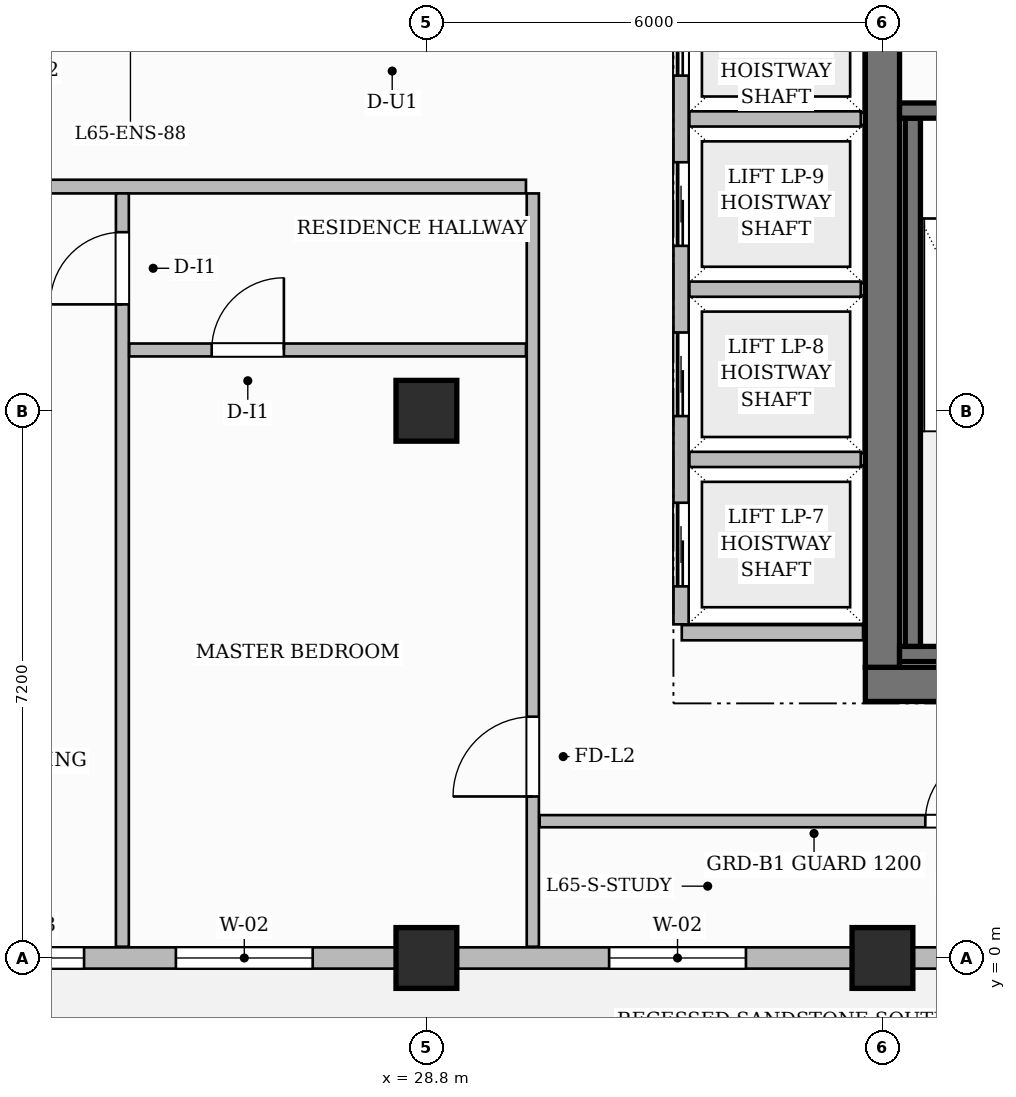
"""IFC4 building model, lengths in metres.
Left out: names, types, materials, properties, quantities, classifications, styles, units other than length and angle.
Written with IfcOpenShell. Run it as: python <this file> out.ifc"""

import sys

from ifc_helpers import new_model, si_unit, direction, frame, frame_2d, origin, origin_2d, place, context, subcontext, project, spatial, rectangle, extrude, source, transform, mapped, element, fill, save


model = new_model("IFC4")
c1 = context("Model", 3, precision=1e-05, world=origin(), true_north=direction((0.0, 1.0)))
c2 = subcontext(c1, "Body", "Model", "MODEL_VIEW")
j1 = project(units=[si_unit("LENGTHUNIT", "METRE"), si_unit("PLANEANGLEUNIT", "RADIAN")], contexts=[c1])
p1 = place(None, origin())
s1 = spatial("IfcSite", under=j1, at=p1, CompositionType="ELEMENT")
p2 = place(p1, origin())
s2 = spatial("IfcBuilding", under=s1, at=p2, CompositionType="ELEMENT")
p3 = place(p2, frame((0.0, 0.0, 259.65)))
s3 = spatial("IfcBuildingStorey", under=s2, at=p3, CompositionType="ELEMENT", Elevation=259.65)
p4 = place(p3, frame((34.575, 3.6, 0.0), z_axis=(0.0, 0.0, 1.0), x_axis=(1.0, 0.0, 0.0)))
e1 = element("IfcWall", 1, at=p4, inside=s3, PredefinedType="SHEAR", context=c2, shape_type="SweptSolid", body=[
    extrude(rectangle(XDim=15.45, YDim=0.45, at=frame_2d((7.725, 0.0))), origin(), (0.0, 0.0, 1.0), 3.85),
])
p5 = place(p4, frame((4.775, 0.0, 0.0)))
e2 = element("IfcOpeningElement", 2, at=p5, cuts=e1, PredefinedType="OPENING", context=c2, shape_type="SweptSolid", body=[
    extrude(rectangle(XDim=0.9, YDim=2.1, at=frame_2d((0.45, 1.05))), frame((0.0, 0.235, 0.0), z_axis=(0.0, -1.0, 0.0), x_axis=(1.0, 0.0, 0.0)), (0.0, 0.0, 1.0), 0.47),
])
p6 = place(p4, frame((7.195, 0.0, 0.0)))
e3 = element("IfcOpeningElement", 3, at=p6, cuts=e1, PredefinedType="OPENING", context=c2, shape_type="SweptSolid", body=[
    extrude(rectangle(XDim=0.9, YDim=2.1, at=frame_2d((0.45, 1.05))), frame((0.0, 0.235, 0.0), z_axis=(0.0, -1.0, 0.0), x_axis=(1.0, 0.0, 0.0)), (0.0, 0.0, 1.0), 0.47),
])
p7 = place(p3, frame((34.8, 3.825, 0.0), z_axis=(0.0, 0.0, 1.0), x_axis=(0.0, 1.0, 0.0)))
e4 = element("IfcWall", 4, at=p7, inside=s3, PredefinedType="SHEAR", context=c2, shape_type="SweptSolid", body=[
    extrude(rectangle(XDim=10.35, YDim=0.45, at=frame_2d((5.175, 0.0))), origin(), (0.0, 0.0, 1.0), 3.85),
])
m1 = source(origin(), c2, "Body", "SweptSolid", [
    extrude(rectangle(XDim=0.8, YDim=0.8, at=origin_2d()), origin(), (0.0, 0.0, 1.0), 3.85),
])
for number, where, z_axis, x_axis in (
    (5, (28.8, 0.0, 0.0), (0.0, 0.0, 1.0), (1.0, 0.0, 0.0)),
    (6, (28.8, 7.2, 0.0), (0.0, 0.0, 1.0), (1.0, 0.0, 0.0)),
    (7, (34.8, 0.0, 0.0), (0.0, 0.0, 1.0), (1.0, 0.0, 0.0)),
):
    element("IfcColumn", number, at=place(p3, frame(where, z_axis=z_axis, x_axis=x_axis)), inside=s3, PredefinedType="COLUMN", context=c2, shape_type="MappedRepresentation", body=[
        mapped(m1, transform((0.0, 0.0, 0.0), scale=1.0)),
    ])
p8 = place(p3, frame((35.025, 4.0, 0.0), z_axis=(0.0, 0.0, 1.0), x_axis=(1.0, 0.0, 0.0)))
e8 = element("IfcWall", 8, at=p8, inside=s3, PredefinedType="SHEAR", context=c2, shape_type="SweptSolid", body=[
    extrude(rectangle(XDim=3.215, YDim=0.2, at=frame_2d((1.607, 0.0))), origin(), (0.0, 0.0, 1.0), 3.85),
])
p9 = place(p3, frame((35.2, 4.1, 0.0), z_axis=(0.0, 0.0, 1.0), x_axis=(0.0, 1.0, 0.0)))
e9 = element("IfcWall", 9, at=p9, inside=s3, PredefinedType="SHEAR", context=c2, shape_type="SweptSolid", body=[
    extrude(rectangle(XDim=6.95, YDim=0.2, at=frame_2d((3.475, 0.0))), origin(), (0.0, 0.0, 1.0), 3.85),
])
p10 = place(p3, frame((35.025, 11.15, 0.0), z_axis=(0.0, 0.0, 1.0), x_axis=(1.0, 0.0, 0.0)))
e10 = element("IfcWall", 10, at=p10, inside=s3, PredefinedType="SHEAR", context=c2, shape_type="SweptSolid", body=[
    extrude(rectangle(XDim=3.215, YDim=0.2, at=frame_2d((1.607, 0.0))), origin(), (0.0, 0.0, 1.0), 3.85),
])
p11 = place(p10, frame((1.12, 0.0, 0.0)))
e11 = element("IfcOpeningElement", 11, at=p11, cuts=e10, PredefinedType="OPENING", context=c2, shape_type="SweptSolid", body=[
    extrude(rectangle(XDim=1.05, YDim=2.2, at=frame_2d((0.525, 1.1))), frame((0.0, 0.11, 0.0), z_axis=(0.0, -1.0, 0.0), x_axis=(1.0, 0.0, 0.0)), (0.0, 0.0, 1.0), 0.22),
])
p12 = place(p3, frame((32.16, 4.28, 0.0), z_axis=(0.0, 0.0, 1.0), x_axis=(1.0, 0.0, 0.0)))
e12 = element("IfcWall", 12, at=p12, inside=s3, PredefinedType="PARTITIONING", context=c2, shape_type="SweptSolid", body=[
    extrude(rectangle(XDim=2.385, YDim=0.2, at=frame_2d((1.192, 0.0))), origin(), (0.0, 0.0, 1.0), 3.6),
])
p13 = place(p3, frame((32.15, 4.39, 0.0), z_axis=(0.0, 0.0, 1.0), x_axis=(0.0, 1.0, 0.0)))
e13 = element("IfcWall", 13, at=p13, inside=s3, PredefinedType="PARTITIONING", context=c2, shape_type="SweptSolid", body=[
    extrude(rectangle(XDim=8.82, YDim=0.2, at=frame_2d((4.41, 0.0))), origin(), (0.0, 0.0, 1.0), 3.6),
])
p14 = place(p13, frame((0.5, 0.0, 0.0)))
e14 = element("IfcOpeningElement", 14, at=p14, cuts=e13, PredefinedType="OPENING", context=c2, shape_type="SweptSolid", body=[
    extrude(rectangle(XDim=1.1, YDim=2.2, at=frame_2d((0.55, 1.1))), frame((0.0, 0.11, 0.0), z_axis=(0.0, -1.0, 0.0), x_axis=(1.0, 0.0, 0.0)), (0.0, 0.0, 1.0), 0.22),
])
p15 = place(p13, frame((2.74, 0.0, 0.0)))
e15 = element("IfcOpeningElement", 15, at=p15, cuts=e13, PredefinedType="OPENING", context=c2, shape_type="SweptSolid", body=[
    extrude(rectangle(XDim=1.1, YDim=2.2, at=frame_2d((0.55, 1.1))), frame((0.0, 0.11, 0.0), z_axis=(0.0, -1.0, 0.0), x_axis=(1.0, 0.0, 0.0)), (0.0, 0.0, 1.0), 0.22),
])
p16 = place(p13, frame((4.98, 0.0, 0.0)))
e16 = element("IfcOpeningElement", 16, at=p16, cuts=e13, PredefinedType="OPENING", context=c2, shape_type="SweptSolid", body=[
    extrude(rectangle(XDim=1.1, YDim=2.2, at=frame_2d((0.55, 1.1))), frame((0.0, 0.11, 0.0), z_axis=(0.0, -1.0, 0.0), x_axis=(1.0, 0.0, 0.0)), (0.0, 0.0, 1.0), 0.22),
])
p17 = place(p13, frame((7.22, 0.0, 0.0)))
e17 = element("IfcOpeningElement", 17, at=p17, cuts=e13, PredefinedType="OPENING", context=c2, shape_type="SweptSolid", body=[
    extrude(rectangle(XDim=1.1, YDim=2.2, at=frame_2d((0.55, 1.1))), frame((0.0, 0.11, 0.0), z_axis=(0.0, -1.0, 0.0), x_axis=(1.0, 0.0, 0.0)), (0.0, 0.0, 1.0), 0.22),
])
for number, where, z_axis, x_axis in (
    (18, (32.26, 6.56, 0.0), (0.0, 0.0, 1.0), (1.0, 0.0, 0.0)),
    (19, (32.26, 8.8, 0.0), (0.0, 0.0, 1.0), (1.0, 0.0, 0.0)),
    (20, (32.26, 11.04, 0.0), (0.0, 0.0, 1.0), (1.0, 0.0, 0.0)),
):
    element("IfcWall", number, at=place(p3, frame(where, z_axis=z_axis, x_axis=x_axis)), inside=s3, PredefinedType="PARTITIONING", context=c2, shape_type="SweptSolid", body=[
        extrude(rectangle(XDim=2.255, YDim=0.2, at=frame_2d((1.127, 0.0))), origin(), (0.0, 0.0, 1.0), 3.6),
    ])
p18 = place(p3, frame((18.148, 10.15, 0.0), z_axis=(0.0, 0.0, 1.0), x_axis=(1.0, 0.0, 0.0)))
e21 = element("IfcWall", 21, at=p18, inside=s3, PredefinedType="PARTITIONING", context=c2, shape_type="SweptSolid", body=[
    extrude(rectangle(XDim=11.962, YDim=0.18, at=frame_2d((5.981, 0.0))), origin(), (0.0, 0.0, 1.0), 3.6),
])
p19 = place(p18, frame((3.942, 0.0, 0.0)))
e22 = element("IfcOpeningElement", 22, at=p19, cuts=e21, PredefinedType="OPENING", context=c2, shape_type="SweptSolid", body=[
    extrude(rectangle(XDim=1.05, YDim=2.25, at=frame_2d((0.525, 1.125))), frame((0.0, 0.1, 0.0), z_axis=(0.0, -1.0, 0.0), x_axis=(1.0, 0.0, 0.0)), (0.0, 0.0, 1.0), 0.2),
])
p20 = place(p3, frame((30.2, 0.148, 0.0), z_axis=(0.0, 0.0, 1.0), x_axis=(0.0, 1.0, 0.0)))
e23 = element("IfcWall", 23, at=p20, inside=s3, PredefinedType="PARTITIONING", context=c2, shape_type="SweptSolid", body=[
    extrude(rectangle(XDim=9.912, YDim=0.16, at=frame_2d((4.956, 0.0))), origin(), (0.0, 0.0, 1.0), 3.6),
])
p21 = place(p20, frame((1.977, 0.0, 0.0)))
e24 = element("IfcOpeningElement", 24, at=p21, cuts=e23, PredefinedType="OPENING", context=c2, shape_type="SweptSolid", body=[
    extrude(rectangle(XDim=1.05, YDim=2.15, at=frame_2d((0.525, 1.075))), frame((0.0, 0.09, 0.0), z_axis=(0.0, -1.0, 0.0), x_axis=(1.0, 0.0, 0.0)), (0.0, 0.0, 1.0), 0.18),
])
p22 = place(p3, frame((30.29, 1.8, 0.0), z_axis=(0.0, 0.0, 1.0), x_axis=(1.0, 0.0, 0.0)))
e25 = element("IfcWall", 25, at=p22, inside=s3, PredefinedType="PARTITIONING", context=c2, shape_type="SweptSolid", body=[
    extrude(rectangle(XDim=19.37, YDim=0.16, at=frame_2d((9.685, 0.0))), origin(), (0.0, 0.0, 1.0), 3.6),
])
p23 = place(p22, frame((5.074, 0.0, 0.0)))
e26 = element("IfcOpeningElement", 26, at=p23, cuts=e25, PredefinedType="OPENING", context=c2, shape_type="SweptSolid", body=[
    extrude(rectangle(XDim=0.9, YDim=2.15, at=frame_2d((0.45, 1.075))), frame((0.0, 0.09, 0.0), z_axis=(0.0, -1.0, 0.0), x_axis=(1.0, 0.0, 0.0)), (0.0, 0.0, 1.0), 0.18),
])
p24 = place(p22, frame((14.06, 0.0, 0.0)))
e27 = element("IfcOpeningElement", 27, at=p24, cuts=e25, PredefinedType="OPENING", context=c2, shape_type="SweptSolid", body=[
    extrude(rectangle(XDim=0.9, YDim=2.15, at=frame_2d((0.45, 1.075))), frame((0.0, 0.09, 0.0), z_axis=(0.0, -1.0, 0.0), x_axis=(1.0, 0.0, 0.0)), (0.0, 0.0, 1.0), 0.18),
])
p25 = place(p3, frame((24.8, 0.148, 0.0), z_axis=(0.0, 0.0, 1.0), x_axis=(0.0, 1.0, 0.0)))
e28 = element("IfcWall", 28, at=p25, inside=s3, PredefinedType="PARTITIONING", context=c2, shape_type="SweptSolid", body=[
    extrude(rectangle(XDim=9.912, YDim=0.17, at=frame_2d((4.956, 0.0))), origin(), (0.0, 0.0, 1.0), 3.6),
])
p26 = place(p25, frame((8.452, 0.0, 0.0)))
e29 = element("IfcOpeningElement", 29, at=p26, cuts=e28, PredefinedType="OPENING", context=c2, shape_type="SweptSolid", body=[
    extrude(rectangle(XDim=0.95, YDim=2.15, at=frame_2d((0.475, 1.075))), frame((0.0, 0.095, 0.0), z_axis=(0.0, -1.0, 0.0), x_axis=(1.0, 0.0, 0.0)), (0.0, 0.0, 1.0), 0.19),
])
p27 = place(p3, frame((24.89, 8.0, 0.0), z_axis=(0.0, 0.0, 1.0), x_axis=(1.0, 0.0, 0.0)))
e30 = element("IfcWall", 30, at=p27, inside=s3, PredefinedType="PARTITIONING", context=c2, shape_type="SweptSolid", body=[
    extrude(rectangle(XDim=5.22, YDim=0.17, at=frame_2d((2.61, 0.0))), origin(), (0.0, 0.0, 1.0), 3.6),
])
p28 = place(p27, frame((1.085, 0.0, 0.0)))
e31 = element("IfcOpeningElement", 31, at=p28, cuts=e30, PredefinedType="OPENING", context=c2, shape_type="SweptSolid", body=[
    extrude(rectangle(XDim=0.95, YDim=2.15, at=frame_2d((0.475, 1.075))), frame((0.0, 0.095, 0.0), z_axis=(0.0, -1.0, 0.0), x_axis=(1.0, 0.0, 0.0)), (0.0, 0.0, 1.0), 0.19),
])
p29 = place(p3, frame((18.0, 0.0, 0.0), z_axis=(0.0, 0.0, 1.0), x_axis=(1.0, 0.0, 0.0)))
e32 = element("IfcWall", 32, at=p29, inside=s3, PredefinedType="SOLIDWALL", context=c2, shape_type="SweptSolid", body=[
    extrude(rectangle(XDim=31.8, YDim=0.28, at=frame_2d((15.9, 0.0))), origin(), (0.0, 0.0, 1.0), 3.185),
])
p30 = place(p29, frame((0.42, 0.0, 0.0)))
e33 = element("IfcOpeningElement", 33, at=p30, cuts=e32, PredefinedType="OPENING", context=c2, shape_type="SweptSolid", body=[
    extrude(rectangle(XDim=1.2, YDim=2.2, at=frame_2d((0.6, 1.1))), frame((0.0, 0.15, 0.0), z_axis=(0.0, -1.0, 0.0), x_axis=(1.0, 0.0, 0.0)), (0.0, 0.0, 1.0), 0.3),
])
p31 = place(p29, frame((4.896, 0.0, 0.8)))
e34 = element("IfcOpeningElement", 34, at=p31, cuts=e32, PredefinedType="OPENING", context=c2, shape_type="SweptSolid", body=[
    extrude(rectangle(XDim=1.4, YDim=1.85, at=frame_2d((0.7, 0.925))), frame((0.0, 0.15, 0.0), z_axis=(0.0, -1.0, 0.0), x_axis=(1.0, 0.0, 0.0)), (0.0, 0.0, 1.0), 0.3),
])
p32 = place(p29, frame((7.504, 0.0, 0.8)))
e35 = element("IfcOpeningElement", 35, at=p32, cuts=e32, PredefinedType="OPENING", context=c2, shape_type="SweptSolid", body=[
    extrude(rectangle(XDim=1.8, YDim=1.85, at=frame_2d((0.9, 0.925))), frame((0.0, 0.15, 0.0), z_axis=(0.0, -1.0, 0.0), x_axis=(1.0, 0.0, 0.0)), (0.0, 0.0, 1.0), 0.3),
])
p33 = place(p29, frame((13.204, 0.0, 0.8)))
e36 = element("IfcOpeningElement", 36, at=p33, cuts=e32, PredefinedType="OPENING", context=c2, shape_type="SweptSolid", body=[
    extrude(rectangle(XDim=1.8, YDim=1.85, at=frame_2d((0.9, 0.925))), frame((0.0, 0.15, 0.0), z_axis=(0.0, -1.0, 0.0), x_axis=(1.0, 0.0, 0.0)), (0.0, 0.0, 1.0), 0.3),
])
p34 = place(p29, frame((18.796, 0.0, 0.8)))
e37 = element("IfcOpeningElement", 37, at=p34, cuts=e32, PredefinedType="OPENING", context=c2, shape_type="SweptSolid", body=[
    extrude(rectangle(XDim=1.8, YDim=1.85, at=frame_2d((0.9, 0.925))), frame((0.0, 0.15, 0.0), z_axis=(0.0, -1.0, 0.0), x_axis=(1.0, 0.0, 0.0)), (0.0, 0.0, 1.0), 0.3),
])
p35 = place(p29, frame((22.029, 0.0, 0.8)))
e38 = element("IfcOpeningElement", 38, at=p35, cuts=e32, PredefinedType="OPENING", context=c2, shape_type="SweptSolid", body=[
    extrude(rectangle(XDim=0.95, YDim=1.75, at=frame_2d((0.475, 0.875))), frame((0.0, 0.15, 0.0), z_axis=(0.0, -1.0, 0.0), x_axis=(1.0, 0.0, 0.0)), (0.0, 0.0, 1.0), 0.3),
])
p36 = place(p29, frame((25.475, 0.0, 0.8)))
e39 = element("IfcOpeningElement", 39, at=p36, cuts=e32, PredefinedType="OPENING", context=c2, shape_type="SweptSolid", body=[
    extrude(rectangle(XDim=1.8, YDim=1.85, at=frame_2d((0.9, 0.925))), frame((0.0, 0.15, 0.0), z_axis=(0.0, -1.0, 0.0), x_axis=(1.0, 0.0, 0.0)), (0.0, 0.0, 1.0), 0.3),
])
p37 = place(p29, frame((28.525, 0.0, 0.8)))
e40 = element("IfcOpeningElement", 40, at=p37, cuts=e32, PredefinedType="OPENING", context=c2, shape_type="SweptSolid", body=[
    extrude(rectangle(XDim=1.8, YDim=1.85, at=frame_2d((0.9, 0.925))), frame((0.0, 0.15, 0.0), z_axis=(0.0, -1.0, 0.0), x_axis=(1.0, 0.0, 0.0)), (0.0, 0.0, 1.0), 0.3),
])
m2 = source(origin(), c2, "Body", "SweptSolid", [
    extrude(rectangle(XDim=1.05, YDim=2.15, at=frame_2d((0.525, 1.075))), frame((0.0, 0.025, 0.0), z_axis=(0.0, -1.0, 0.0), x_axis=(1.0, 0.0, 0.0)), (0.0, 0.0, 1.0), 0.05),
])
p38 = place(p21, origin())
e41 = element("IfcDoor", 41, at=p38, inside=s3, OperationType="SINGLE_SWING_LEFT", PredefinedType="DOOR", context=c2, shape_type="MappedRepresentation", body=[
    mapped(m2, transform((0.0, 0.0, 0.0), scale=1.0)),
])
fill(e24, e41)
m3 = source(origin(), c2, "Body", "SweptSolid", [
    extrude(rectangle(XDim=0.9, YDim=2.15, at=frame_2d((0.45, 1.075))), frame((0.0, 0.025, 0.0), z_axis=(0.0, -1.0, 0.0), x_axis=(1.0, 0.0, 0.0)), (0.0, 0.0, 1.0), 0.05),
])
p39 = place(p23, origin())
e42 = element("IfcDoor", 42, at=p39, inside=s3, OperationType="SINGLE_SWING_RIGHT", PredefinedType="DOOR", context=c2, shape_type="MappedRepresentation", body=[
    mapped(m3, transform((0.0, 0.0, 0.0), scale=1.0)),
])
fill(e26, e42)
m4 = source(origin(), c2, "Body", "SweptSolid", [
    extrude(rectangle(XDim=0.95, YDim=2.15, at=frame_2d((0.475, 1.075))), frame((0.0, 0.025, 0.0), z_axis=(0.0, -1.0, 0.0), x_axis=(1.0, 0.0, 0.0)), (0.0, 0.0, 1.0), 0.05),
])
p40 = place(p26, origin())
e43 = element("IfcDoor", 43, at=p40, inside=s3, OperationType="SINGLE_SWING_LEFT", PredefinedType="DOOR", context=c2, shape_type="MappedRepresentation", body=[
    mapped(m4, transform((0.0, 0.0, 0.0), scale=1.0)),
])
fill(e29, e43)
p41 = place(p28, origin())
e44 = element("IfcDoor", 44, at=p41, inside=s3, OperationType="SINGLE_SWING_RIGHT", PredefinedType="DOOR", context=c2, shape_type="MappedRepresentation", body=[
    mapped(m4, transform((0.0, 0.0, 0.0), scale=1.0)),
])
fill(e31, e44)
m5 = source(origin(), c2, "Body", "SweptSolid", [
    extrude(rectangle(XDim=1.1, YDim=2.2, at=frame_2d((0.55, 1.1))), frame((0.0, 0.025, 0.0), z_axis=(0.0, -1.0, 0.0), x_axis=(1.0, 0.0, 0.0)), (0.0, 0.0, 1.0), 0.05),
])
p42 = place(p14, origin())
e45 = element("IfcDoor", 45, at=p42, inside=s3, OperationType="SLIDING_TO_LEFT", PredefinedType="DOOR", context=c2, shape_type="MappedRepresentation", body=[
    mapped(m5, transform((0.0, 0.0, 0.0), scale=1.0)),
])
fill(e14, e45)
p43 = place(p15, origin())
e46 = element("IfcDoor", 46, at=p43, inside=s3, OperationType="SLIDING_TO_LEFT", PredefinedType="DOOR", context=c2, shape_type="MappedRepresentation", body=[
    mapped(m5, transform((0.0, 0.0, 0.0), scale=1.0)),
])
fill(e15, e46)
p44 = place(p16, origin())
e47 = element("IfcDoor", 47, at=p44, inside=s3, OperationType="SLIDING_TO_LEFT", PredefinedType="DOOR", context=c2, shape_type="MappedRepresentation", body=[
    mapped(m5, transform((0.0, 0.0, 0.0), scale=1.0)),
])
fill(e16, e47)
p45 = place(p17, origin())
e48 = element("IfcDoor", 48, at=p45, inside=s3, OperationType="SLIDING_TO_LEFT", PredefinedType="DOOR", context=c2, shape_type="MappedRepresentation", body=[
    mapped(m5, transform((0.0, 0.0, 0.0), scale=1.0)),
])
fill(e17, e48)
m6 = source(origin(), c2, "Body", "SweptSolid", [
    extrude(rectangle(XDim=1.4, YDim=1.85, at=frame_2d((0.7, 0.925))), frame((0.0, 0.03, 0.0), z_axis=(0.0, -1.0, 0.0), x_axis=(1.0, 0.0, 0.0)), (0.0, 0.0, 1.0), 0.06),
])
p46 = place(p31, origin())
e49 = element("IfcWindow", 49, at=p46, inside=s3, PartitioningType="SINGLE_PANEL", PredefinedType="WINDOW", context=c2, shape_type="MappedRepresentation", body=[
    mapped(m6, transform((0.0, 0.0, 0.0), scale=1.0)),
])
fill(e34, e49)
m7 = source(origin(), c2, "Body", "SweptSolid", [
    extrude(rectangle(XDim=1.8, YDim=1.85, at=frame_2d((0.9, 0.925))), frame((0.0, 0.03, 0.0), z_axis=(0.0, -1.0, 0.0), x_axis=(1.0, 0.0, 0.0)), (0.0, 0.0, 1.0), 0.06),
])
p47 = place(p32, origin())
e50 = element("IfcWindow", 50, at=p47, inside=s3, PartitioningType="DOUBLE_PANEL_VERTICAL", PredefinedType="WINDOW", context=c2, shape_type="MappedRepresentation", body=[
    mapped(m7, transform((0.0, 0.0, 0.0), scale=1.0)),
])
fill(e35, e50)
p48 = place(p33, origin())
e51 = element("IfcWindow", 51, at=p48, inside=s3, PartitioningType="DOUBLE_PANEL_VERTICAL", PredefinedType="WINDOW", context=c2, shape_type="MappedRepresentation", body=[
    mapped(m7, transform((0.0, 0.0, 0.0), scale=1.0)),
])
fill(e36, e51)
save(model, sys.argv[1])
